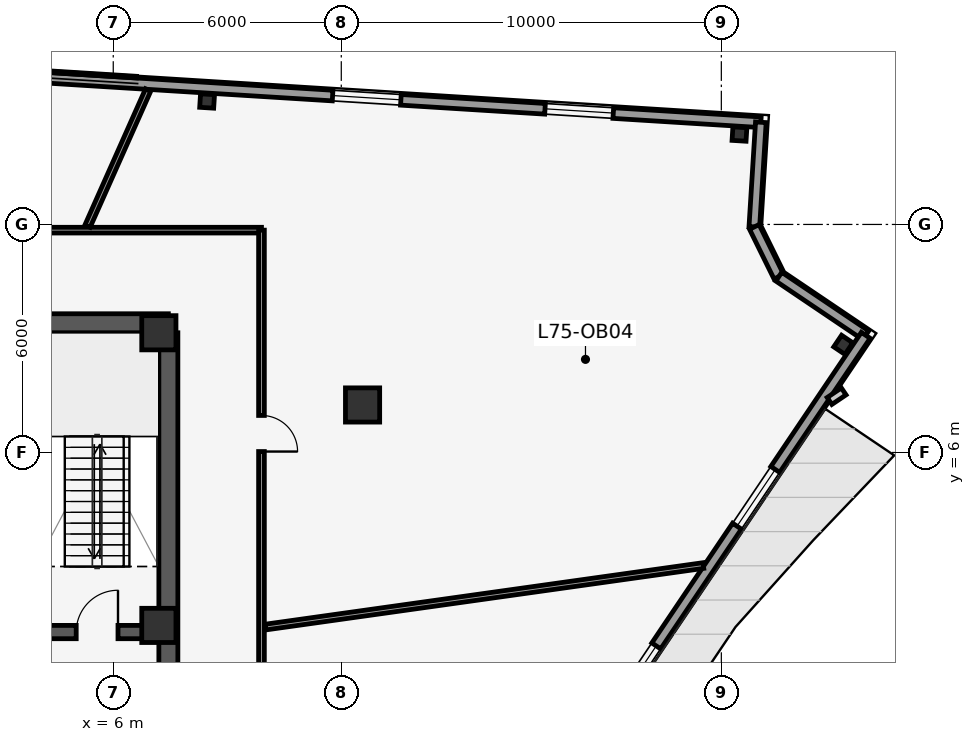
"""IFC4 building model, lengths in metres.
Left out: names, types, materials, properties, quantities, classifications, styles, units other than length and angle.
Written with IfcOpenShell. Run it as: python <this file> out.ifc"""

import sys

from ifc_helpers import new_model, si_unit, direction, frame, frame_2d, origin, origin_2d, place, context, subcontext, project, spatial, rectangle, i_section, extrude, element, fill, save


model = new_model("IFC4")
c1 = context("Model", 3, precision=1e-05, world=origin(), true_north=direction((0.0, 1.0)))
c2 = subcontext(c1, "Body", "Model", "MODEL_VIEW")
j1 = project(units=[si_unit("LENGTHUNIT", "METRE"), si_unit("PLANEANGLEUNIT", "RADIAN")], contexts=[c1])
p1 = place(None, origin())
s1 = spatial("IfcSite", under=j1, at=p1, CompositionType="ELEMENT")
p2 = place(p1, origin())
s2 = spatial("IfcBuilding", under=s1, at=p2, CompositionType="ELEMENT")
p3 = place(p2, frame((0.0, 0.0, 318.8)))
s3 = spatial("IfcBuildingStorey", under=s2, at=p3, CompositionType="ELEMENT", Elevation=318.8)
p4 = place(p3, frame((-7.45, 9.4, 0.0), z_axis=(0.0, 0.0, 1.0), x_axis=(1.0, 0.0, 0.0)))
e1 = element("IfcWall", 1, at=p4, inside=s3, PredefinedType="SHEAR", context=c2, shape_type="SweptSolid", body=[
    extrude(rectangle(XDim=14.9, YDim=0.5, at=frame_2d((7.45, 0.0))), origin(), (0.0, 0.0, 1.0), 4.32),
])
p5 = place(p4, frame((6.9, 0.0, 0.0)))
e2 = element("IfcOpeningElement", 2, at=p5, cuts=e1, PredefinedType="OPENING", context=c2, shape_type="SweptSolid", body=[
    extrude(rectangle(XDim=1.1, YDim=2.15, at=frame_2d((0.55, 1.075))), frame((0.0, 0.26, 0.0), z_axis=(0.0, -1.0, 0.0), x_axis=(1.0, 0.0, 0.0)), (0.0, 0.0, 1.0), 0.52),
])
p6 = place(p4, frame((4.23, 0.0, 0.0)))
e3 = element("IfcOpeningElement", 3, at=p6, cuts=e1, PredefinedType="OPENING", context=c2, shape_type="SweptSolid", body=[
    extrude(rectangle(XDim=0.88, YDim=2.15, at=frame_2d((0.44, 1.075))), frame((0.0, 0.26, 0.0), z_axis=(0.0, -1.0, 0.0), x_axis=(1.0, 0.0, 0.0)), (0.0, 0.0, 1.0), 0.52),
])
p7 = place(p4, frame((9.79, 0.0, 0.0)))
e4 = element("IfcOpeningElement", 4, at=p7, cuts=e1, PredefinedType="OPENING", context=c2, shape_type="SweptSolid", body=[
    extrude(rectangle(XDim=0.88, YDim=2.15, at=frame_2d((0.44, 1.075))), frame((0.0, 0.26, 0.0), z_axis=(0.0, -1.0, 0.0), x_axis=(1.0, 0.0, 0.0)), (0.0, 0.0, 1.0), 0.52),
])
p8 = place(p3, frame((-7.2, 1.275, 0.0), z_axis=(0.0, 0.0, 1.0), x_axis=(1.0, 0.0, 0.0)))
e5 = element("IfcWall", 5, at=p8, inside=s3, PredefinedType="SHEAR", context=c2, shape_type="SweptSolid", body=[
    extrude(rectangle(XDim=14.4, YDim=0.35, at=frame_2d((7.2, 0.0))), origin(), (0.0, 0.0, 1.0), 4.32),
])
p9 = place(p8, frame((3.795, 0.0, 0.0)))
e6 = element("IfcOpeningElement", 6, at=p9, cuts=e5, PredefinedType="OPENING", context=c2, shape_type="SweptSolid", body=[
    extrude(rectangle(XDim=1.25, YDim=2.25, at=frame_2d((0.625, 1.125))), frame((0.0, 0.185, 0.0), z_axis=(0.0, -1.0, 0.0), x_axis=(1.0, 0.0, 0.0)), (0.0, 0.0, 1.0), 0.37),
])
p10 = place(p8, frame((9.355, 0.0, 0.0)))
e7 = element("IfcOpeningElement", 7, at=p10, cuts=e5, PredefinedType="OPENING", context=c2, shape_type="SweptSolid", body=[
    extrude(rectangle(XDim=1.25, YDim=2.25, at=frame_2d((0.625, 1.125))), frame((0.0, 0.185, 0.0), z_axis=(0.0, -1.0, 0.0), x_axis=(1.0, 0.0, 0.0)), (0.0, 0.0, 1.0), 0.37),
])
p11 = place(p8, frame((1.075, 0.0, 0.0)))
e8 = element("IfcOpeningElement", 8, at=p11, cuts=e5, PredefinedType="OPENING", context=c2, shape_type="SweptSolid", body=[
    extrude(rectangle(XDim=1.1, YDim=2.15, at=frame_2d((0.55, 1.075))), frame((0.0, 0.185, 0.0), z_axis=(0.0, -1.0, 0.0), x_axis=(1.0, 0.0, 0.0)), (0.0, 0.0, 1.0), 0.37),
])
p12 = place(p8, frame((12.225, 0.0, 0.0)))
e9 = element("IfcOpeningElement", 9, at=p12, cuts=e5, PredefinedType="OPENING", context=c2, shape_type="SweptSolid", body=[
    extrude(rectangle(XDim=1.1, YDim=2.15, at=frame_2d((0.55, 1.075))), frame((0.0, 0.185, 0.0), z_axis=(0.0, -1.0, 0.0), x_axis=(1.0, 0.0, 0.0)), (0.0, 0.0, 1.0), 0.37),
])
p13 = place(p3, frame((7.45, 0.1, 0.0), z_axis=(0.0, 0.0, 1.0), x_axis=(0.0, 1.0, 0.0)))
e10 = element("IfcWall", 10, at=p13, inside=s3, PredefinedType="SHEAR", context=c2, shape_type="SweptSolid", body=[
    extrude(rectangle(XDim=9.05, YDim=0.5, at=frame_2d((4.525, 0.0))), origin(), (0.0, 0.0, 1.0), 4.32),
])
for number, where, z_axis, x_axis in (
    (11, (7.2, 1.45, 0.0), (0.0, 0.0, 1.0), (1.0, 0.0, 0.0)),
    (12, (7.2, 9.15, 0.0), (0.0, 0.0, 1.0), (1.0, 0.0, 0.0)),
    (13, (12.56, 7.25, 0.0), (0.0, 0.0, 1.0), (1.0, 0.0, 0.0)),
):
    element("IfcColumn", number, at=place(p3, frame(where, z_axis=z_axis, x_axis=x_axis)), inside=s3, PredefinedType="COLUMN", context=c2, shape_type="SweptSolid", body=[
        extrude(rectangle(XDim=0.9, YDim=0.9, at=origin_2d()), origin(), (0.0, 0.0, 1.0), 4.6),
    ])
for number, where, z_axis, x_axis in (
    (14, (25.209, 8.833, 0.0), (0.0, 0.0, 1.0), (0.559, 0.829, 0.0)),
    (15, (22.477, 14.379, 0.0), (0.0, 0.0, 1.0), (-0.998, 0.062, 0.0)),
    (16, (8.469, 15.249, 0.0), (0.0, 0.0, 1.0), (-0.998, 0.062, 0.0)),
):
    element("IfcColumn", number, at=place(p3, frame(where, z_axis=z_axis, x_axis=x_axis)), inside=s3, PredefinedType="COLUMN", context=c2, shape_type="SweptSolid", body=[
        extrude(i_section(OverallWidth=0.368, OverallDepth=0.356, WebThickness=0.011, FlangeThickness=0.018, at=origin_2d()), origin(), (0.0, 0.0, 1.0), 4.6),
    ])
p14 = place(p3, frame((-20.056, 17.376, 0.0), z_axis=(0.0, 0.0, 1.0), x_axis=(0.998061236898, -0.06223959674, 0.0)))
e17 = element("IfcWall", 17, at=p14, inside=s3, PredefinedType="STANDARD", context=c2, shape_type="SweptSolid", body=[
    extrude(rectangle(XDim=43.18, YDim=0.28, at=frame_2d((21.59, 0.0))), origin(), (0.0, 0.0, 1.0), 4.32),
])
p15 = place(p14, frame((3.89, 0.0, 0.85)))
e18 = element("IfcOpeningElement", 18, at=p15, cuts=e17, PredefinedType="OPENING", context=c2, shape_type="SweptSolid", body=[
    extrude(rectangle(XDim=1.8, YDim=2.4, at=frame_2d((0.9, 1.2))), frame((0.0, 0.15, 0.0), z_axis=(0.0, -1.0, 0.0), x_axis=(1.0, 0.0, 0.0)), (0.0, 0.0, 1.0), 0.3),
])
p16 = place(p14, frame((9.49, 0.0, 0.85)))
e19 = element("IfcOpeningElement", 19, at=p16, cuts=e17, PredefinedType="OPENING", context=c2, shape_type="SweptSolid", body=[
    extrude(rectangle(XDim=1.8, YDim=2.4, at=frame_2d((0.9, 1.2))), frame((0.0, 0.15, 0.0), z_axis=(0.0, -1.0, 0.0), x_axis=(1.0, 0.0, 0.0)), (0.0, 0.0, 1.0), 0.3),
])
p17 = place(p14, frame((31.89, 0.0, 0.85)))
e20 = element("IfcOpeningElement", 20, at=p17, cuts=e17, PredefinedType="OPENING", context=c2, shape_type="SweptSolid", body=[
    extrude(rectangle(XDim=1.8, YDim=2.4, at=frame_2d((0.9, 1.2))), frame((0.0, 0.15, 0.0), z_axis=(0.0, -1.0, 0.0), x_axis=(1.0, 0.0, 0.0)), (0.0, 0.0, 1.0), 0.3),
])
p18 = place(p14, frame((37.49, 0.0, 0.85)))
e21 = element("IfcOpeningElement", 21, at=p18, cuts=e17, PredefinedType="OPENING", context=c2, shape_type="SweptSolid", body=[
    extrude(rectangle(XDim=1.8, YDim=2.4, at=frame_2d((0.9, 1.2))), frame((0.0, 0.15, 0.0), z_axis=(0.0, -1.0, 0.0), x_axis=(1.0, 0.0, 0.0)), (0.0, 0.0, 1.0), 0.3),
])
p19 = place(p3, frame((23.04, 14.689, 0.0), z_axis=(0.0, 0.0, 1.0), x_axis=(-0.062295651102, -0.998057739739, 0.0)))
e22 = element("IfcWall", 22, at=p19, inside=s3, PredefinedType="STANDARD", context=c2, shape_type="SweptSolid", body=[
    extrude(rectangle(XDim=2.759, YDim=0.28, at=frame_2d((1.379, 0.0))), origin(), (0.0, 0.0, 1.0), 4.32),
])
p20 = place(p3, frame((22.868, 11.935, 0.0), z_axis=(0.0, 0.0, 1.0), x_axis=(0.441785524615, -0.897120699929, 0.0)))
e23 = element("IfcWall", 23, at=p20, inside=s3, PredefinedType="STANDARD", context=c2, shape_type="SweptSolid", body=[
    extrude(rectangle(XDim=1.459, YDim=0.28, at=frame_2d((0.73, 0.0))), origin(), (0.0, 0.0, 1.0), 4.32),
])
p21 = place(p3, frame((23.513, 10.626, 0.0), z_axis=(0.0, 0.0, 1.0), x_axis=(0.829056864924, -0.559164300294, 0.0)))
e24 = element("IfcWall", 24, at=p21, inside=s3, PredefinedType="STANDARD", context=c2, shape_type="SweptSolid", body=[
    extrude(rectangle(XDim=2.759, YDim=0.28, at=frame_2d((1.379, 0.0))), origin(), (0.0, 0.0, 1.0), 4.32),
])
p22 = place(p3, frame((25.8, 9.083, 0.0), z_axis=(0.0, 0.0, 1.0), x_axis=(-0.55919392155, -0.829036885851, 0.0)))
e25 = element("IfcWall", 25, at=p22, inside=s3, PredefinedType="STANDARD", context=c2, shape_type="SweptSolid", body=[
    extrude(rectangle(XDim=43.915, YDim=0.28, at=frame_2d((21.958, 0.0))), origin(), (0.0, 0.0, 1.0), 4.32),
])
p23 = place(p22, frame((21.457, 0.0, 0.0)))
e26 = element("IfcOpeningElement", 26, at=p23, cuts=e25, PredefinedType="OPENING", context=c2, shape_type="SweptSolid", body=[
    extrude(rectangle(XDim=1.0, YDim=2.15, at=frame_2d((0.5, 1.075))), frame((0.0, 0.15, 0.0), z_axis=(0.0, -1.0, 0.0), x_axis=(1.0, 0.0, 0.0)), (0.0, 0.0, 1.0), 0.3),
])
p24 = place(p22, frame((4.257, 0.0, 0.85)))
e27 = element("IfcOpeningElement", 27, at=p24, cuts=e25, PredefinedType="OPENING", context=c2, shape_type="SweptSolid", body=[
    extrude(rectangle(XDim=1.8, YDim=2.4, at=frame_2d((0.9, 1.2))), frame((0.0, 0.15, 0.0), z_axis=(0.0, -1.0, 0.0), x_axis=(1.0, 0.0, 0.0)), (0.0, 0.0, 1.0), 0.3),
])
p25 = place(p22, frame((9.857, 0.0, 0.85)))
e28 = element("IfcOpeningElement", 28, at=p25, cuts=e25, PredefinedType="OPENING", context=c2, shape_type="SweptSolid", body=[
    extrude(rectangle(XDim=1.8, YDim=2.4, at=frame_2d((0.9, 1.2))), frame((0.0, 0.15, 0.0), z_axis=(0.0, -1.0, 0.0), x_axis=(1.0, 0.0, 0.0)), (0.0, 0.0, 1.0), 0.3),
])
p26 = place(p22, frame((32.257, 0.0, 0.85)))
e29 = element("IfcOpeningElement", 29, at=p26, cuts=e25, PredefinedType="OPENING", context=c2, shape_type="SweptSolid", body=[
    extrude(rectangle(XDim=1.8, YDim=2.4, at=frame_2d((0.9, 1.2))), frame((0.0, 0.15, 0.0), z_axis=(0.0, -1.0, 0.0), x_axis=(1.0, 0.0, 0.0)), (0.0, 0.0, 1.0), 0.3),
])
p27 = place(p22, frame((37.857, 0.0, 0.85)))
e30 = element("IfcOpeningElement", 30, at=p27, cuts=e25, PredefinedType="OPENING", context=c2, shape_type="SweptSolid", body=[
    extrude(rectangle(XDim=1.8, YDim=2.4, at=frame_2d((0.9, 1.2))), frame((0.0, 0.15, 0.0), z_axis=(0.0, -1.0, 0.0), x_axis=(1.0, 0.0, 0.0)), (0.0, 0.0, 1.0), 0.3),
])
p28 = place(p3, frame((-2.22, 11.85, 0.0), z_axis=(0.0, 0.0, 1.0), x_axis=(1.0, 0.0, 0.0)))
e31 = element("IfcWall", 31, at=p28, inside=s3, PredefinedType="PARTITIONING", context=c2, shape_type="SweptSolid", body=[
    extrude(rectangle(XDim=12.12, YDim=0.15, at=frame_2d((6.06, 0.0))), origin(), (0.0, 0.0, 1.0), 4.32),
])
p29 = place(p28, frame((3.418, 0.0, 0.0)))
e32 = element("IfcOpeningElement", 32, at=p29, cuts=e31, PredefinedType="OPENING", context=c2, shape_type="SweptSolid", body=[
    extrude(rectangle(XDim=0.95, YDim=2.15, at=frame_2d((0.475, 1.075))), frame((0.0, 0.085, 0.0), z_axis=(0.0, -1.0, 0.0), x_axis=(1.0, 0.0, 0.0)), (0.0, 0.0, 1.0), 0.17),
])
p30 = place(p3, frame((9.9, 11.85, 0.0), z_axis=(0.0, 0.0, 1.0), x_axis=(0.0, -1.0, 0.0)))
e33 = element("IfcWall", 33, at=p30, inside=s3, PredefinedType="PARTITIONING", context=c2, shape_type="SweptSolid", body=[
    extrude(rectangle(XDim=21.198, YDim=0.15, at=frame_2d((10.599, 0.0))), origin(), (0.0, 0.0, 1.0), 4.32),
])
p31 = place(p30, frame((15.22, 0.0, 0.0)))
e34 = element("IfcOpeningElement", 34, at=p31, cuts=e33, PredefinedType="OPENING", context=c2, shape_type="SweptSolid", body=[
    extrude(rectangle(XDim=0.95, YDim=2.15, at=frame_2d((0.475, 1.075))), frame((0.0, 0.085, 0.0), z_axis=(0.0, -1.0, 0.0), x_axis=(1.0, 0.0, 0.0)), (0.0, 0.0, 1.0), 0.17),
])
p32 = place(p30, frame((4.875, 0.0, 0.0)))
e35 = element("IfcOpeningElement", 35, at=p32, cuts=e33, PredefinedType="OPENING", context=c2, shape_type="SweptSolid", body=[
    extrude(rectangle(XDim=0.95, YDim=2.15, at=frame_2d((0.475, 1.075))), frame((0.0, 0.085, 0.0), z_axis=(0.0, -1.0, 0.0), x_axis=(1.0, 0.0, 0.0)), (0.0, 0.0, 1.0), 0.17),
])
p33 = place(p3, frame((5.323, 11.955, 0.0), z_axis=(0.0, 0.0, 1.0), x_axis=(0.406710056431, 0.913557294316, 0.0)))
e36 = element("IfcWall", 36, at=p33, inside=s3, PredefinedType="PARTITIONING", context=c2, shape_type="SweptSolid", body=[
    extrude(rectangle(XDim=3.923, YDim=0.15, at=frame_2d((1.961, 0.0))), origin(), (0.0, 0.0, 1.0), 4.32),
])
p34 = place(p3, frame((10.005, 1.406, 0.0), z_axis=(0.0, 0.0, 1.0), x_axis=(0.990267561789, 0.13917670807, 0.0)))
e37 = element("IfcWall", 37, at=p34, inside=s3, PredefinedType="PARTITIONING", context=c2, shape_type="SweptSolid", body=[
    extrude(rectangle(XDim=11.635, YDim=0.15, at=frame_2d((5.818, 0.0))), origin(), (0.0, 0.0, 1.0), 4.32),
])
p35 = place(p17, origin())
e38 = element("IfcWindow", 38, at=p35, inside=s3, PartitioningType="DOUBLE_PANEL_VERTICAL", PredefinedType="WINDOW", context=c2, shape_type="SweptSolid", body=[
    extrude(rectangle(XDim=1.8, YDim=2.4, at=frame_2d((0.9, 1.2))), frame((0.0, 0.03, 0.0), z_axis=(0.0, -1.0, 0.0), x_axis=(1.0, 0.0, 0.0)), (0.0, 0.0, 1.0), 0.06),
])
fill(e20, e38)
p36 = place(p18, origin())
e39 = element("IfcWindow", 39, at=p36, inside=s3, PartitioningType="DOUBLE_PANEL_VERTICAL", PredefinedType="WINDOW", context=c2, shape_type="SweptSolid", body=[
    extrude(rectangle(XDim=1.8, YDim=2.4, at=frame_2d((0.9, 1.2))), frame((0.0, 0.03, 0.0), z_axis=(0.0, -1.0, 0.0), x_axis=(1.0, 0.0, 0.0)), (0.0, 0.0, 1.0), 0.06),
])
fill(e21, e39)
p37 = place(p24, origin())
e40 = element("IfcWindow", 40, at=p37, inside=s3, PartitioningType="DOUBLE_PANEL_VERTICAL", PredefinedType="WINDOW", context=c2, shape_type="SweptSolid", body=[
    extrude(rectangle(XDim=1.8, YDim=2.4, at=frame_2d((0.9, 1.2))), frame((0.0, 0.03, 0.0), z_axis=(0.0, -1.0, 0.0), x_axis=(1.0, 0.0, 0.0)), (0.0, 0.0, 1.0), 0.06),
])
fill(e27, e40)
p38 = place(p25, origin())
e41 = element("IfcWindow", 41, at=p38, inside=s3, PartitioningType="DOUBLE_PANEL_VERTICAL", PredefinedType="WINDOW", context=c2, shape_type="SweptSolid", body=[
    extrude(rectangle(XDim=1.8, YDim=2.4, at=frame_2d((0.9, 1.2))), frame((0.0, 0.03, 0.0), z_axis=(0.0, -1.0, 0.0), x_axis=(1.0, 0.0, 0.0)), (0.0, 0.0, 1.0), 0.06),
])
fill(e28, e41)
p39 = place(p12, origin())
e42 = element("IfcDoor", 42, at=p39, inside=s3, OperationType="SINGLE_SWING_RIGHT", PredefinedType="DOOR", context=c2, shape_type="SweptSolid", body=[
    extrude(rectangle(XDim=1.1, YDim=2.15, at=frame_2d((0.55, 1.075))), frame((0.0, 0.025, 0.0), z_axis=(0.0, -1.0, 0.0), x_axis=(1.0, 0.0, 0.0)), (0.0, 0.0, 1.0), 0.05),
])
fill(e9, e42)
p40 = place(p32, origin())
e43 = element("IfcDoor", 43, at=p40, inside=s3, OperationType="SINGLE_SWING_RIGHT", PredefinedType="DOOR", context=c2, shape_type="SweptSolid", body=[
    extrude(rectangle(XDim=0.95, YDim=2.15, at=frame_2d((0.475, 1.075))), frame((0.0, 0.025, 0.0), z_axis=(0.0, -1.0, 0.0), x_axis=(1.0, 0.0, 0.0)), (0.0, 0.0, 1.0), 0.05),
])
fill(e35, e43)
save(model, sys.argv[1])
